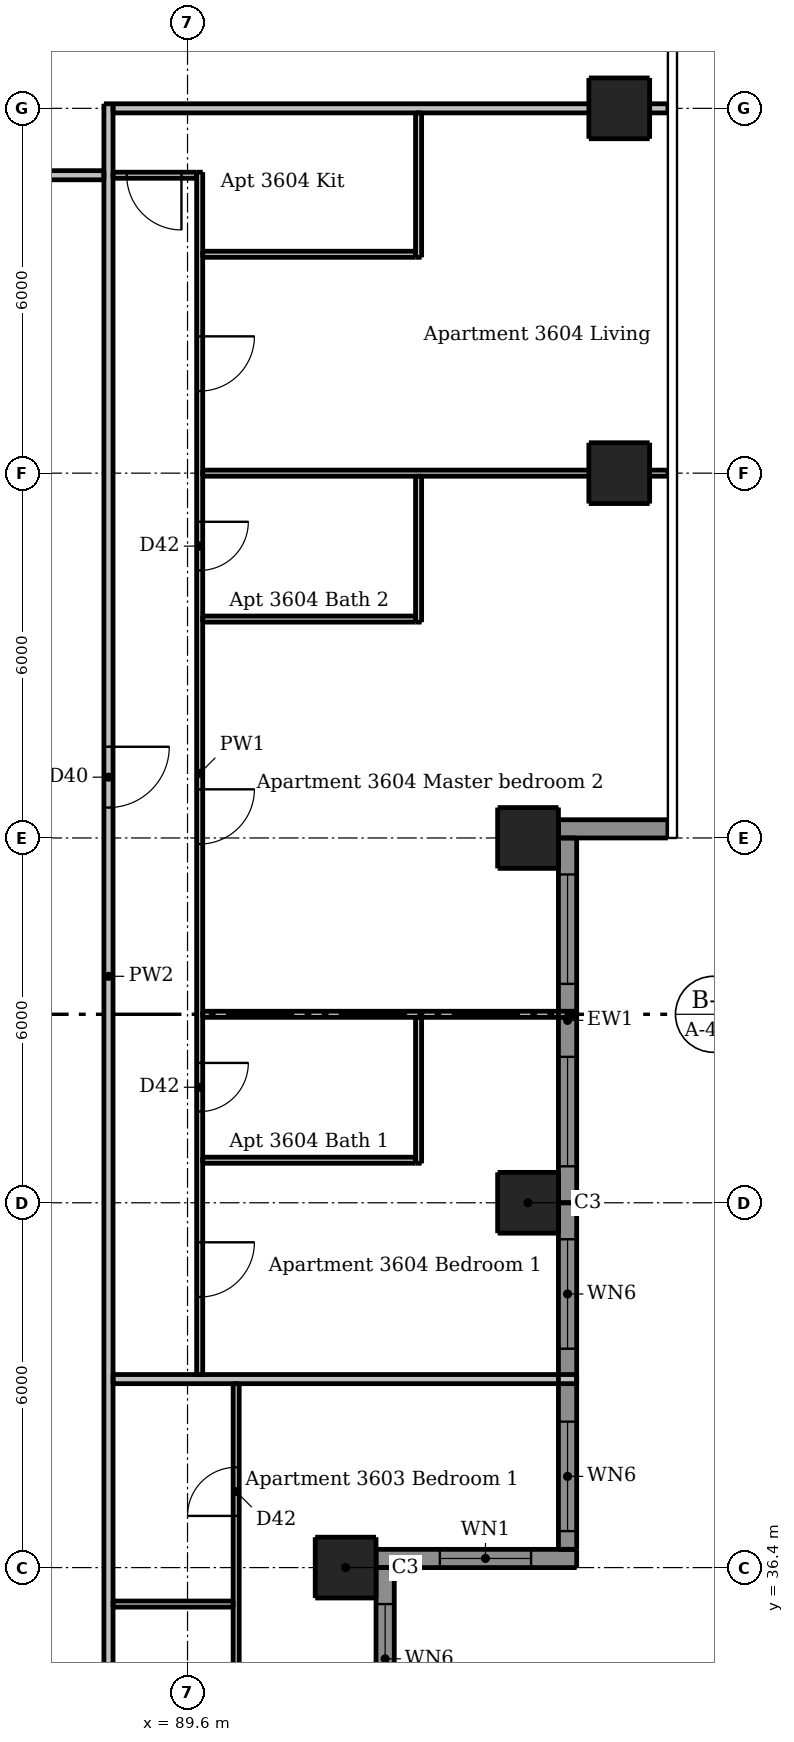
"""IFC4 building model, lengths in metres.
Left out: names, types, materials, properties, quantities, classifications, styles, units other than length and angle.
Written with IfcOpenShell. Run it as: python <this file> out.ifc"""

import sys

from ifc_helpers import new_model, si_unit, direction, frame, frame_2d, origin, origin_2d, place, context, subcontext, project, spatial, rectangle, extrude, element, fill, save


model = new_model("IFC4")
c1 = context("Model", 3, precision=1e-05, world=origin(), true_north=direction((0.0, 1.0)))
c2 = subcontext(c1, "Body", "Model", "MODEL_VIEW")
j1 = project(units=[si_unit("LENGTHUNIT", "METRE"), si_unit("PLANEANGLEUNIT", "RADIAN")], contexts=[c1])
p1 = place(None, origin())
s1 = spatial("IfcSite", under=j1, at=p1, CompositionType="ELEMENT")
p2 = place(p1, origin())
s2 = spatial("IfcBuilding", under=s1, at=p2, CompositionType="ELEMENT")
p3 = place(p2, frame((0.0, 0.0, 137.2)))
s3 = spatial("IfcBuildingStorey", under=s2, at=p3, CompositionType="ELEMENT", Elevation=137.2)
for number, where, z_axis, x_axis in (
    (1, (92.2, 36.4, 0.0), (0.0, 0.0, 1.0), (1.0, 0.0, 0.0)),
    (2, (95.2, 42.4, 0.0), (0.0, 0.0, 1.0), (1.0, 0.0, 0.0)),
    (3, (95.2, 48.4, 0.0), (0.0, 0.0, 1.0), (1.0, 0.0, 0.0)),
    (4, (96.7, 54.4, 0.0), (0.0, 0.0, 1.0), (1.0, 0.0, 0.0)),
    (5, (96.7, 60.4, 0.0), (0.0, 0.0, 1.0), (1.0, 0.0, 0.0)),
):
    element("IfcColumn", number, at=place(p3, frame(where, z_axis=z_axis, x_axis=x_axis)), inside=s3, PredefinedType="COLUMN", context=c2, shape_type="SweptSolid", body=[
        extrude(rectangle(XDim=1.0, YDim=1.0, at=origin_2d()), origin(), (0.0, 0.0, 1.0), 3.05),
    ])
p4 = place(p3, frame((92.7, 36.55, 0.0), z_axis=(0.0, 0.0, 1.0), x_axis=(1.0, 0.0, 0.0)))
e6 = element("IfcWall", 6, at=p4, inside=s3, PredefinedType="SOLIDWALL", context=c2, shape_type="SweptSolid", body=[
    extrude(rectangle(XDim=3.3, YDim=0.3, at=frame_2d((1.65, 0.0))), origin(), (0.0, 0.0, 1.0), 3.05),
])
p5 = place(p4, frame((1.05, 0.0, 0.9)))
e7 = element("IfcOpeningElement", 7, at=p5, cuts=e6, PredefinedType="OPENING", context=c2, shape_type="SweptSolid", body=[
    extrude(rectangle(XDim=1.5, YDim=1.5, at=frame_2d((0.75, 0.75))), frame((0.0, 0.16, 0.0), z_axis=(0.0, -1.0, 0.0), x_axis=(1.0, 0.0, 0.0)), (0.0, 0.0, 1.0), 0.32),
])
p6 = place(p3, frame((95.7, 48.55, 0.0), z_axis=(0.0, 0.0, 1.0), x_axis=(1.0, 0.0, 0.0)))
e8 = element("IfcWall", 8, at=p6, inside=s3, PredefinedType="SOLIDWALL", context=c2, shape_type="SweptSolid", body=[
    extrude(rectangle(XDim=1.8, YDim=0.3, at=frame_2d((0.9, 0.0))), origin(), (0.0, 0.0, 1.0), 3.05),
])
p7 = place(p3, frame((92.85, 30.1, 0.0), z_axis=(0.0, 0.0, 1.0), x_axis=(0.0, 1.0, 0.0)))
e9 = element("IfcWall", 9, at=p7, inside=s3, PredefinedType="SOLIDWALL", context=c2, shape_type="SweptSolid", body=[
    extrude(rectangle(XDim=6.3, YDim=0.3, at=frame_2d((3.15, 0.0))), origin(), (0.0, 0.0, 1.0), 3.05),
])
p8 = place(p7, frame((0.9, 0.0, 0.15)))
e10 = element("IfcOpeningElement", 10, at=p8, cuts=e9, PredefinedType="OPENING", context=c2, shape_type="SweptSolid", body=[
    extrude(rectangle(XDim=1.8, YDim=2.1, at=frame_2d((0.9, 1.05))), frame((0.0, 0.16, 0.0), z_axis=(0.0, -1.0, 0.0), x_axis=(1.0, 0.0, 0.0)), (0.0, 0.0, 1.0), 0.32),
])
p9 = place(p7, frame((3.9, 0.0, 0.15)))
e11 = element("IfcOpeningElement", 11, at=p9, cuts=e9, PredefinedType="OPENING", context=c2, shape_type="SweptSolid", body=[
    extrude(rectangle(XDim=1.8, YDim=2.1, at=frame_2d((0.9, 1.05))), frame((0.0, 0.16, 0.0), z_axis=(0.0, -1.0, 0.0), x_axis=(1.0, 0.0, 0.0)), (0.0, 0.0, 1.0), 0.32),
])
p10 = place(p3, frame((95.85, 36.7, 0.0), z_axis=(0.0, 0.0, 1.0), x_axis=(0.0, 1.0, 0.0)))
e12 = element("IfcWall", 12, at=p10, inside=s3, PredefinedType="SOLIDWALL", context=c2, shape_type="SweptSolid", body=[
    extrude(rectangle(XDim=5.7, YDim=0.3, at=frame_2d((2.85, 0.0))), origin(), (0.0, 0.0, 1.0), 3.05),
])
p11 = place(p10, frame((0.3, 0.0, 0.15)))
e13 = element("IfcOpeningElement", 13, at=p11, cuts=e12, PredefinedType="OPENING", context=c2, shape_type="SweptSolid", body=[
    extrude(rectangle(XDim=1.8, YDim=2.1, at=frame_2d((0.9, 1.05))), frame((0.0, 0.16, 0.0), z_axis=(0.0, -1.0, 0.0), x_axis=(1.0, 0.0, 0.0)), (0.0, 0.0, 1.0), 0.32),
])
p12 = place(p10, frame((3.3, 0.0, 0.15)))
e14 = element("IfcOpeningElement", 14, at=p12, cuts=e12, PredefinedType="OPENING", context=c2, shape_type="SweptSolid", body=[
    extrude(rectangle(XDim=1.8, YDim=2.1, at=frame_2d((0.9, 1.05))), frame((0.0, 0.16, 0.0), z_axis=(0.0, -1.0, 0.0), x_axis=(1.0, 0.0, 0.0)), (0.0, 0.0, 1.0), 0.32),
])
p13 = place(p3, frame((95.85, 42.4, 0.0), z_axis=(0.0, 0.0, 1.0), x_axis=(0.0, 1.0, 0.0)))
e15 = element("IfcWall", 15, at=p13, inside=s3, PredefinedType="SOLIDWALL", context=c2, shape_type="SweptSolid", body=[
    extrude(rectangle(XDim=6.0, YDim=0.3, at=frame_2d((3.0, 0.0))), origin(), (0.0, 0.0, 1.0), 3.05),
])
p14 = place(p13, frame((0.6, 0.0, 0.15)))
e16 = element("IfcOpeningElement", 16, at=p14, cuts=e15, PredefinedType="OPENING", context=c2, shape_type="SweptSolid", body=[
    extrude(rectangle(XDim=1.8, YDim=2.1, at=frame_2d((0.9, 1.05))), frame((0.0, 0.16, 0.0), z_axis=(0.0, -1.0, 0.0), x_axis=(1.0, 0.0, 0.0)), (0.0, 0.0, 1.0), 0.32),
])
p15 = place(p13, frame((3.6, 0.0, 0.15)))
e17 = element("IfcOpeningElement", 17, at=p15, cuts=e15, PredefinedType="OPENING", context=c2, shape_type="SweptSolid", body=[
    extrude(rectangle(XDim=1.8, YDim=2.1, at=frame_2d((0.9, 1.05))), frame((0.0, 0.16, 0.0), z_axis=(0.0, -1.0, 0.0), x_axis=(1.0, 0.0, 0.0)), (0.0, 0.0, 1.0), 0.32),
])
p16 = place(p3, frame((89.8, 59.35, 0.0), z_axis=(0.0, 0.0, 1.0), x_axis=(0.0, -1.0, 0.0)))
e18 = element("IfcWall", 18, at=p16, inside=s3, PredefinedType="PARTITIONING", context=c2, shape_type="SweptSolid", body=[
    extrude(rectangle(XDim=19.775, YDim=0.1, at=frame_2d((9.888, 0.0))), origin(), (0.0, 0.0, 1.0), 3.05),
])
p17 = place(p16, frame((2.7, 0.0, 0.0)))
e19 = element("IfcOpeningElement", 19, at=p17, cuts=e18, PredefinedType="OPENING", context=c2, shape_type="SweptSolid", body=[
    extrude(rectangle(XDim=0.9, YDim=2.1, at=frame_2d((0.45, 1.05))), frame((0.0, 0.06, 0.0), z_axis=(0.0, -1.0, 0.0), x_axis=(1.0, 0.0, 0.0)), (0.0, 0.0, 1.0), 0.12),
])
p18 = place(p16, frame((17.6, 0.0, 0.0)))
e20 = element("IfcOpeningElement", 20, at=p18, cuts=e18, PredefinedType="OPENING", context=c2, shape_type="SweptSolid", body=[
    extrude(rectangle(XDim=0.9, YDim=2.1, at=frame_2d((0.45, 1.05))), frame((0.0, 0.06, 0.0), z_axis=(0.0, -1.0, 0.0), x_axis=(1.0, 0.0, 0.0)), (0.0, 0.0, 1.0), 0.12),
])
p19 = place(p16, frame((10.15, 0.0, 0.0)))
e21 = element("IfcOpeningElement", 21, at=p19, cuts=e18, PredefinedType="OPENING", context=c2, shape_type="SweptSolid", body=[
    extrude(rectangle(XDim=0.9, YDim=2.1, at=frame_2d((0.45, 1.05))), frame((0.0, 0.06, 0.0), z_axis=(0.0, -1.0, 0.0), x_axis=(1.0, 0.0, 0.0)), (0.0, 0.0, 1.0), 0.12),
])
p20 = place(p16, frame((14.65, 0.0, 0.0)))
e22 = element("IfcOpeningElement", 22, at=p20, cuts=e18, PredefinedType="OPENING", context=c2, shape_type="SweptSolid", body=[
    extrude(rectangle(XDim=0.8, YDim=2.1, at=frame_2d((0.4, 1.05))), frame((0.0, 0.06, 0.0), z_axis=(0.0, -1.0, 0.0), x_axis=(1.0, 0.0, 0.0)), (0.0, 0.0, 1.0), 0.12),
])
p21 = place(p16, frame((5.75, 0.0, 0.0)))
e23 = element("IfcOpeningElement", 23, at=p21, cuts=e18, PredefinedType="OPENING", context=c2, shape_type="SweptSolid", body=[
    extrude(rectangle(XDim=0.8, YDim=2.1, at=frame_2d((0.4, 1.05))), frame((0.0, 0.06, 0.0), z_axis=(0.0, -1.0, 0.0), x_axis=(1.0, 0.0, 0.0)), (0.0, 0.0, 1.0), 0.12),
])
p22 = place(p3, frame((90.4, 33.45, 0.0), z_axis=(0.0, 0.0, 1.0), x_axis=(0.0, 1.0, 0.0)))
e24 = element("IfcWall", 24, at=p22, inside=s3, PredefinedType="PARTITIONING", context=c2, shape_type="SweptSolid", body=[
    extrude(rectangle(XDim=5.975, YDim=0.1, at=frame_2d((2.988, 0.0))), origin(), (0.0, 0.0, 1.0), 3.05),
])
p23 = place(p22, frame((3.8, 0.0, 0.0)))
e25 = element("IfcOpeningElement", 25, at=p23, cuts=e24, PredefinedType="OPENING", context=c2, shape_type="SweptSolid", body=[
    extrude(rectangle(XDim=0.8, YDim=2.1, at=frame_2d((0.4, 1.05))), frame((0.0, 0.06, 0.0), z_axis=(0.0, -1.0, 0.0), x_axis=(1.0, 0.0, 0.0)), (0.0, 0.0, 1.0), 0.12),
])
p24 = place(p3, frame((93.4, 43.05, 0.0), z_axis=(0.0, 0.0, 1.0), x_axis=(0.0, 1.0, 0.0)))
e26 = element("IfcWall", 26, at=p24, inside=s3, PredefinedType="PARTITIONING", context=c2, shape_type="SweptSolid", body=[
    extrude(rectangle(XDim=2.4, YDim=0.1, at=frame_2d((1.2, 0.0))), origin(), (0.0, 0.0, 1.0), 3.05),
])
p25 = place(p3, frame((93.4, 51.95, 0.0), z_axis=(0.0, 0.0, 1.0), x_axis=(0.0, 1.0, 0.0)))
e27 = element("IfcWall", 27, at=p25, inside=s3, PredefinedType="PARTITIONING", context=c2, shape_type="SweptSolid", body=[
    extrude(rectangle(XDim=2.4, YDim=0.1, at=frame_2d((1.2, 0.0))), origin(), (0.0, 0.0, 1.0), 3.05),
])
p26 = place(p3, frame((93.4, 57.95, 0.0), z_axis=(0.0, 0.0, 1.0), x_axis=(0.0, 1.0, 0.0)))
e28 = element("IfcWall", 28, at=p26, inside=s3, PredefinedType="PARTITIONING", context=c2, shape_type="SweptSolid", body=[
    extrude(rectangle(XDim=2.375, YDim=0.1, at=frame_2d((1.188, 0.0))), origin(), (0.0, 0.0, 1.0), 3.05),
])
p27 = place(p3, frame((89.75, 59.3, 0.0), z_axis=(0.0, 0.0, 1.0), x_axis=(-1.0, 0.0, 0.0)))
e29 = element("IfcWall", 29, at=p27, inside=s3, PredefinedType="PARTITIONING", context=c2, shape_type="SweptSolid", body=[
    extrude(rectangle(XDim=1.375, YDim=0.1, at=frame_2d((0.688, 0.0))), origin(), (0.0, 0.0, 1.0), 3.05),
])
p28 = place(p27, frame((0.25, 0.0, 0.0)))
e30 = element("IfcOpeningElement", 30, at=p28, cuts=e29, PredefinedType="OPENING", context=c2, shape_type="SweptSolid", body=[
    extrude(rectangle(XDim=0.9, YDim=2.1, at=frame_2d((0.45, 1.05))), frame((0.0, 0.06, 0.0), z_axis=(0.0, -1.0, 0.0), x_axis=(1.0, 0.0, 0.0)), (0.0, 0.0, 1.0), 0.12),
])
p29 = place(p3, frame((89.85, 58.0, 0.0), z_axis=(0.0, 0.0, 1.0), x_axis=(1.0, 0.0, 0.0)))
e31 = element("IfcWall", 31, at=p29, inside=s3, PredefinedType="PARTITIONING", context=c2, shape_type="SweptSolid", body=[
    extrude(rectangle(XDim=3.5, YDim=0.1, at=frame_2d((1.75, 0.0))), origin(), (0.0, 0.0, 1.0), 3.05),
])
p30 = place(p3, frame((89.85, 54.4, 0.0), z_axis=(0.0, 0.0, 1.0), x_axis=(1.0, 0.0, 0.0)))
e32 = element("IfcWall", 32, at=p30, inside=s3, PredefinedType="PARTITIONING", context=c2, shape_type="SweptSolid", body=[
    extrude(rectangle(XDim=7.65, YDim=0.1, at=frame_2d((3.825, 0.0))), origin(), (0.0, 0.0, 1.0), 2.516),
])
p31 = place(p3, frame((89.85, 52.0, 0.0), z_axis=(0.0, 0.0, 1.0), x_axis=(1.0, 0.0, 0.0)))
e33 = element("IfcWall", 33, at=p31, inside=s3, PredefinedType="PARTITIONING", context=c2, shape_type="SweptSolid", body=[
    extrude(rectangle(XDim=3.5, YDim=0.1, at=frame_2d((1.75, 0.0))), origin(), (0.0, 0.0, 1.0), 3.05),
])
p32 = place(p3, frame((89.85, 45.5, 0.0), z_axis=(0.0, 0.0, 1.0), x_axis=(1.0, 0.0, 0.0)))
e34 = element("IfcWall", 34, at=p32, inside=s3, PredefinedType="PARTITIONING", context=c2, shape_type="SweptSolid", body=[
    extrude(rectangle(XDim=6.15, YDim=0.1, at=frame_2d((3.075, 0.0))), origin(), (0.0, 0.0, 1.0), 3.05),
])
p33 = place(p3, frame((89.85, 43.1, 0.0), z_axis=(0.0, 0.0, 1.0), x_axis=(1.0, 0.0, 0.0)))
e35 = element("IfcWall", 35, at=p33, inside=s3, PredefinedType="PARTITIONING", context=c2, shape_type="SweptSolid", body=[
    extrude(rectangle(XDim=3.5, YDim=0.1, at=frame_2d((1.75, 0.0))), origin(), (0.0, 0.0, 1.0), 3.05),
])
p34 = place(p3, frame((88.375, 35.8, 0.0), z_axis=(0.0, 0.0, 1.0), x_axis=(1.0, 0.0, 0.0)))
e36 = element("IfcWall", 36, at=p34, inside=s3, PredefinedType="PARTITIONING", context=c2, shape_type="SweptSolid", body=[
    extrude(rectangle(XDim=1.975, YDim=0.1, at=frame_2d((0.988, 0.0))), origin(), (0.0, 0.0, 1.0), 3.05),
])
p35 = place(p3, frame((88.3, 60.475, 0.0), z_axis=(0.0, 0.0, 1.0), x_axis=(0.0, -1.0, 0.0)))
e37 = element("IfcWall", 37, at=p35, inside=s3, PredefinedType="PARTITIONING", context=c2, shape_type="SweptSolid", body=[
    extrude(rectangle(XDim=28.7, YDim=0.15, at=frame_2d((14.35, 0.0))), origin(), (0.0, 0.0, 1.0), 3.05),
])
p36 = place(p35, frame((27.425, 0.0, 0.0)))
e38 = element("IfcOpeningElement", 38, at=p36, cuts=e37, PredefinedType="OPENING", context=c2, shape_type="SweptSolid", body=[
    extrude(rectangle(XDim=1.0, YDim=2.1, at=frame_2d((0.5, 1.05))), frame((0.0, 0.085, 0.0), z_axis=(0.0, -1.0, 0.0), x_axis=(1.0, 0.0, 0.0)), (0.0, 0.0, 1.0), 0.17),
])
p37 = place(p35, frame((10.575, 0.0, 0.0)))
e39 = element("IfcOpeningElement", 39, at=p37, cuts=e37, PredefinedType="OPENING", context=c2, shape_type="SweptSolid", body=[
    extrude(rectangle(XDim=1.0, YDim=2.1, at=frame_2d((0.5, 1.05))), frame((0.0, 0.085, 0.0), z_axis=(0.0, -1.0, 0.0), x_axis=(1.0, 0.0, 0.0)), (0.0, 0.0, 1.0), 0.17),
])
p38 = place(p3, frame((88.375, 60.4, 0.0), z_axis=(0.0, 0.0, 1.0), x_axis=(1.0, 0.0, 0.0)))
e40 = element("IfcWall", 40, at=p38, inside=s3, PredefinedType="PARTITIONING", context=c2, shape_type="SweptSolid", body=[
    extrude(rectangle(XDim=9.125, YDim=0.15, at=frame_2d((4.562, 0.0))), origin(), (0.0, 0.0, 1.0), 2.647),
])
p39 = place(p3, frame((59.675, 59.3, 0.0), z_axis=(0.0, 0.0, 1.0), x_axis=(1.0, 0.0, 0.0)))
e41 = element("IfcWall", 41, at=p39, inside=s3, PredefinedType="PARTITIONING", context=c2, shape_type="SweptSolid", body=[
    extrude(rectangle(XDim=28.55, YDim=0.15, at=frame_2d((14.275, 0.0))), origin(), (0.0, 0.0, 1.0), 3.05),
])
p40 = place(p39, frame((8.975, 0.0, 0.0)))
e42 = element("IfcOpeningElement", 42, at=p40, cuts=e41, PredefinedType="OPENING", context=c2, shape_type="SweptSolid", body=[
    extrude(rectangle(XDim=1.0, YDim=2.1, at=frame_2d((0.5, 1.05))), frame((0.0, 0.085, 0.0), z_axis=(0.0, -1.0, 0.0), x_axis=(1.0, 0.0, 0.0)), (0.0, 0.0, 1.0), 0.17),
])
p41 = place(p39, frame((25.775, 0.0, 0.0)))
e43 = element("IfcOpeningElement", 43, at=p41, cuts=e41, PredefinedType="OPENING", context=c2, shape_type="SweptSolid", body=[
    extrude(rectangle(XDim=1.0, YDim=2.1, at=frame_2d((0.5, 1.05))), frame((0.0, 0.085, 0.0), z_axis=(0.0, -1.0, 0.0), x_axis=(1.0, 0.0, 0.0)), (0.0, 0.0, 1.0), 0.17),
])
p42 = place(p3, frame((88.375, 39.5, 0.0), z_axis=(0.0, 0.0, 1.0), x_axis=(1.0, 0.0, 0.0)))
e44 = element("IfcWall", 44, at=p42, inside=s3, PredefinedType="PARTITIONING", context=c2, shape_type="SweptSolid", body=[
    extrude(rectangle(XDim=7.625, YDim=0.15, at=frame_2d((3.812, 0.0))), origin(), (0.0, 0.0, 1.0), 3.05),
])
p43 = place(p5, origin())
e45 = element("IfcWindow", 45, at=p43, inside=s3, PartitioningType="DOUBLE_PANEL_VERTICAL", PredefinedType="WINDOW", context=c2, shape_type="SweptSolid", body=[
    extrude(rectangle(XDim=1.5, YDim=1.5, at=frame_2d((0.75, 0.75))), frame((0.0, 0.03, 0.0), z_axis=(0.0, -1.0, 0.0), x_axis=(1.0, 0.0, 0.0)), (0.0, 0.0, 1.0), 0.06),
])
fill(e7, e45)
p44 = place(p9, origin())
e46 = element("IfcWindow", 46, at=p44, inside=s3, PartitioningType="DOUBLE_PANEL_VERTICAL", PredefinedType="WINDOW", context=c2, shape_type="SweptSolid", body=[
    extrude(rectangle(XDim=1.8, YDim=2.1, at=frame_2d((0.9, 1.05))), frame((0.0, 0.03, 0.0), z_axis=(0.0, -1.0, 0.0), x_axis=(1.0, 0.0, 0.0)), (0.0, 0.0, 1.0), 0.06),
])
fill(e11, e46)
p45 = place(p11, origin())
e47 = element("IfcWindow", 47, at=p45, inside=s3, PartitioningType="DOUBLE_PANEL_VERTICAL", PredefinedType="WINDOW", context=c2, shape_type="SweptSolid", body=[
    extrude(rectangle(XDim=1.8, YDim=2.1, at=frame_2d((0.9, 1.05))), frame((0.0, 0.03, 0.0), z_axis=(0.0, -1.0, 0.0), x_axis=(1.0, 0.0, 0.0)), (0.0, 0.0, 1.0), 0.06),
])
fill(e13, e47)
p46 = place(p12, origin())
e48 = element("IfcWindow", 48, at=p46, inside=s3, PartitioningType="DOUBLE_PANEL_VERTICAL", PredefinedType="WINDOW", context=c2, shape_type="SweptSolid", body=[
    extrude(rectangle(XDim=1.8, YDim=2.1, at=frame_2d((0.9, 1.05))), frame((0.0, 0.03, 0.0), z_axis=(0.0, -1.0, 0.0), x_axis=(1.0, 0.0, 0.0)), (0.0, 0.0, 1.0), 0.06),
])
fill(e14, e48)
p47 = place(p14, origin())
e49 = element("IfcWindow", 49, at=p47, inside=s3, PartitioningType="DOUBLE_PANEL_VERTICAL", PredefinedType="WINDOW", context=c2, shape_type="SweptSolid", body=[
    extrude(rectangle(XDim=1.8, YDim=2.1, at=frame_2d((0.9, 1.05))), frame((0.0, 0.03, 0.0), z_axis=(0.0, -1.0, 0.0), x_axis=(1.0, 0.0, 0.0)), (0.0, 0.0, 1.0), 0.06),
])
fill(e16, e49)
p48 = place(p15, origin())
e50 = element("IfcWindow", 50, at=p48, inside=s3, PartitioningType="DOUBLE_PANEL_VERTICAL", PredefinedType="WINDOW", context=c2, shape_type="SweptSolid", body=[
    extrude(rectangle(XDim=1.8, YDim=2.1, at=frame_2d((0.9, 1.05))), frame((0.0, 0.03, 0.0), z_axis=(0.0, -1.0, 0.0), x_axis=(1.0, 0.0, 0.0)), (0.0, 0.0, 1.0), 0.06),
])
fill(e17, e50)
p49 = place(p23, origin())
e51 = element("IfcDoor", 51, at=p49, inside=s3, OperationType="SINGLE_SWING_LEFT", PredefinedType="DOOR", context=c2, shape_type="SweptSolid", body=[
    extrude(rectangle(XDim=0.8, YDim=2.1, at=frame_2d((0.4, 1.05))), frame((0.0, 0.025, 0.0), z_axis=(0.0, -1.0, 0.0), x_axis=(1.0, 0.0, 0.0)), (0.0, 0.0, 1.0), 0.05),
])
fill(e25, e51)
p50 = place(p37, origin())
e52 = element("IfcDoor", 52, at=p50, inside=s3, OperationType="SINGLE_SWING_LEFT", PredefinedType="DOOR", context=c2, shape_type="SweptSolid", body=[
    extrude(rectangle(XDim=1.0, YDim=2.1, at=frame_2d((0.5, 1.05))), frame((0.0, 0.025, 0.0), z_axis=(0.0, -1.0, 0.0), x_axis=(1.0, 0.0, 0.0)), (0.0, 0.0, 1.0), 0.05),
])
fill(e39, e52)
p51 = place(p17, origin())
e53 = element("IfcDoor", 53, at=p51, inside=s3, OperationType="SINGLE_SWING_LEFT", PredefinedType="DOOR", context=c2, shape_type="SweptSolid", body=[
    extrude(rectangle(XDim=0.9, YDim=2.1, at=frame_2d((0.45, 1.05))), frame((0.0, 0.025, 0.0), z_axis=(0.0, -1.0, 0.0), x_axis=(1.0, 0.0, 0.0)), (0.0, 0.0, 1.0), 0.05),
])
fill(e19, e53)
p52 = place(p28, origin())
e54 = element("IfcDoor", 54, at=p52, inside=s3, OperationType="SINGLE_SWING_LEFT", PredefinedType="DOOR", context=c2, shape_type="SweptSolid", body=[
    extrude(rectangle(XDim=0.9, YDim=2.1, at=frame_2d((0.45, 1.05))), frame((0.0, 0.025, 0.0), z_axis=(0.0, -1.0, 0.0), x_axis=(1.0, 0.0, 0.0)), (0.0, 0.0, 1.0), 0.05),
])
fill(e30, e54)
p53 = place(p18, origin())
e55 = element("IfcDoor", 55, at=p53, inside=s3, OperationType="SINGLE_SWING_LEFT", PredefinedType="DOOR", context=c2, shape_type="SweptSolid", body=[
    extrude(rectangle(XDim=0.9, YDim=2.1, at=frame_2d((0.45, 1.05))), frame((0.0, 0.025, 0.0), z_axis=(0.0, -1.0, 0.0), x_axis=(1.0, 0.0, 0.0)), (0.0, 0.0, 1.0), 0.05),
])
fill(e20, e55)
p54 = place(p19, origin())
e56 = element("IfcDoor", 56, at=p54, inside=s3, OperationType="SINGLE_SWING_LEFT", PredefinedType="DOOR", context=c2, shape_type="SweptSolid", body=[
    extrude(rectangle(XDim=0.9, YDim=2.1, at=frame_2d((0.45, 1.05))), frame((0.0, 0.025, 0.0), z_axis=(0.0, -1.0, 0.0), x_axis=(1.0, 0.0, 0.0)), (0.0, 0.0, 1.0), 0.05),
])
fill(e21, e56)
p55 = place(p20, origin())
e57 = element("IfcDoor", 57, at=p55, inside=s3, OperationType="SINGLE_SWING_LEFT", PredefinedType="DOOR", context=c2, shape_type="SweptSolid", body=[
    extrude(rectangle(XDim=0.8, YDim=2.1, at=frame_2d((0.4, 1.05))), frame((0.0, 0.025, 0.0), z_axis=(0.0, -1.0, 0.0), x_axis=(1.0, 0.0, 0.0)), (0.0, 0.0, 1.0), 0.05),
])
fill(e22, e57)
p56 = place(p21, origin())
e58 = element("IfcDoor", 58, at=p56, inside=s3, OperationType="SINGLE_SWING_LEFT", PredefinedType="DOOR", context=c2, shape_type="SweptSolid", body=[
    extrude(rectangle(XDim=0.8, YDim=2.1, at=frame_2d((0.4, 1.05))), frame((0.0, 0.025, 0.0), z_axis=(0.0, -1.0, 0.0), x_axis=(1.0, 0.0, 0.0)), (0.0, 0.0, 1.0), 0.05),
])
fill(e23, e58)
save(model, sys.argv[1])
